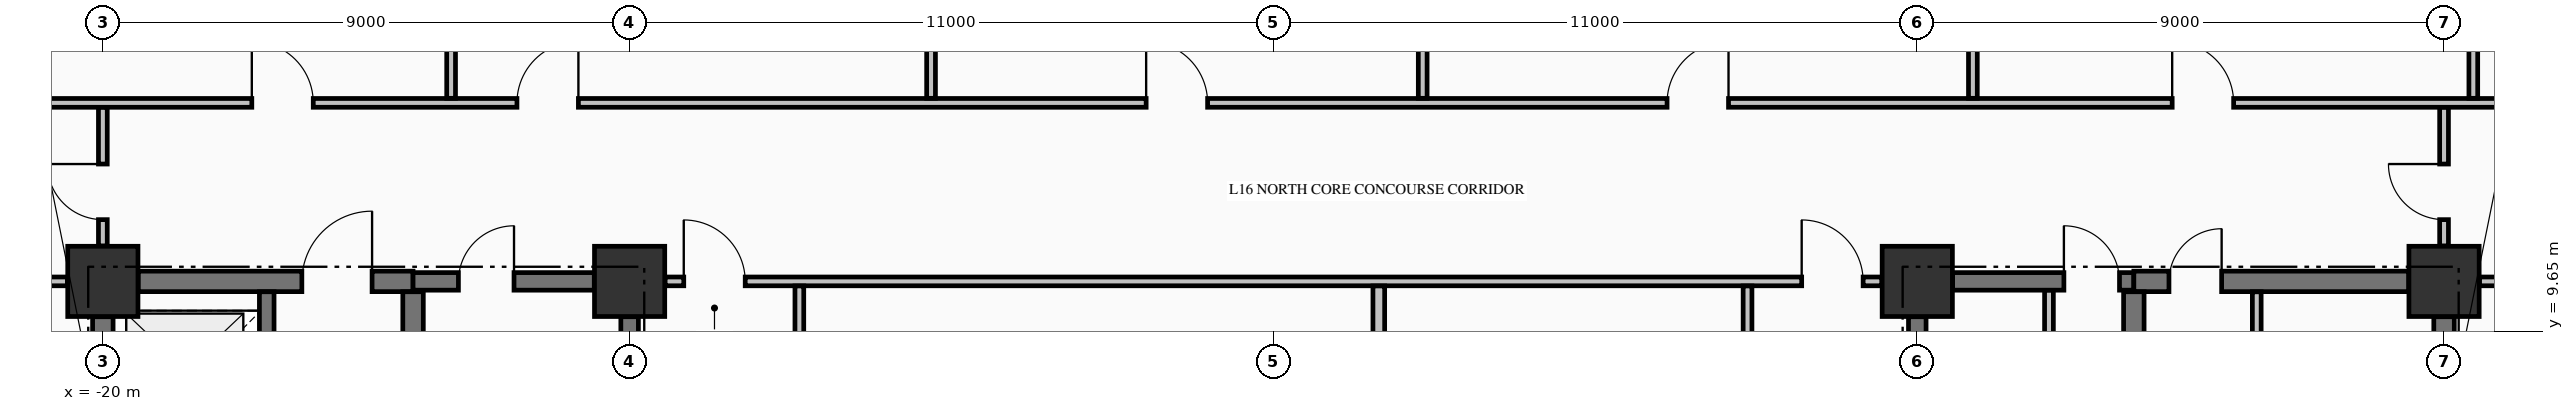
"""IFC4 building model, lengths in metres.
Left out: names, types, materials, properties, quantities, classifications, styles, units other than length and angle.
Written with IfcOpenShell. Run it as: python <this file> out.ifc"""

import sys

from ifc_helpers import new_model, si_unit, direction, frame, frame_2d, origin, origin_2d, place, context, subcontext, project, spatial, rectangle, extrude, element, fill, save


model = new_model("IFC4")
c1 = context("Model", 3, precision=1e-05, world=origin(), true_north=direction((0.0, 1.0)))
c2 = subcontext(c1, "Body", "Model", "MODEL_VIEW")
j1 = project(units=[si_unit("LENGTHUNIT", "METRE"), si_unit("PLANEANGLEUNIT", "RADIAN")], contexts=[c1])
p1 = place(None, origin())
s1 = spatial("IfcSite", under=j1, at=p1, CompositionType="ELEMENT")
p2 = place(p1, origin())
s2 = spatial("IfcBuilding", under=s1, at=p2, CompositionType="ELEMENT")
p3 = place(p2, frame((0.0, 0.0, 67.9)))
s3 = spatial("IfcBuildingStorey", under=s2, at=p3, CompositionType="ELEMENT", Elevation=67.9)
for number, where, z_axis, x_axis in (
    (1, (-20.0, 10.5, -0.25), (0.0, 0.0, 1.0), (1.0, 0.0, 0.0)),
    (2, (-11.0, 10.5, -0.25), (0.0, 0.0, 1.0), (1.0, 0.0, 0.0)),
    (3, (11.0, 10.5, -0.25), (0.0, 0.0, 1.0), (1.0, 0.0, 0.0)),
    (4, (20.0, 10.5, -0.25), (0.0, 0.0, 1.0), (1.0, 0.0, 0.0)),
):
    element("IfcColumn", number, at=place(p3, frame(where, z_axis=z_axis, x_axis=x_axis)), inside=s3, PredefinedType="COLUMN", context=c2, shape_type="SweptSolid", body=[
        extrude(rectangle(XDim=1.2, YDim=1.2, at=origin_2d()), origin(), (0.0, 0.0, 1.0), 3.495),
    ])
p4 = place(p3, frame((-19.396, 10.5, 0.0), z_axis=(0.0, 0.0, 1.0), x_axis=(1.0, 0.0, 0.0)))
e5 = element("IfcWall", 5, at=p4, inside=s3, PredefinedType="SHEAR", context=c2, shape_type="SweptSolid", body=[
    extrude(rectangle(XDim=4.696, YDim=0.35, at=frame_2d((2.348, 0.0))), origin(), (0.0, 0.0, 1.0), 3.245),
])
p5 = place(p4, frame((2.796, 0.0, 0.0)))
e6 = element("IfcOpeningElement", 6, at=p5, cuts=e5, PredefinedType="OPENING", context=c2, shape_type="SweptSolid", body=[
    extrude(rectangle(XDim=1.2, YDim=2.15, at=frame_2d((0.6, 1.075))), frame((0.0, 0.185, 0.0), z_axis=(0.0, -1.0, 0.0), x_axis=(1.0, 0.0, 0.0)), (0.0, 0.0, 1.0), 0.37),
])
p6 = place(p3, frame((-14.7, 10.5, 0.0), z_axis=(0.0, 0.0, 1.0), x_axis=(1.0, 0.0, 0.0)))
e7 = element("IfcWall", 7, at=p6, inside=s3, PredefinedType="SHEAR", context=c2, shape_type="SweptSolid", body=[
    extrude(rectangle(XDim=3.096, YDim=0.3, at=frame_2d((1.548, 0.0))), origin(), (0.0, 0.0, 1.0), 3.245),
])
p7 = place(p6, frame((0.775, 0.0, 0.0)))
e8 = element("IfcOpeningElement", 8, at=p7, cuts=e7, PredefinedType="OPENING", context=c2, shape_type="SweptSolid", body=[
    extrude(rectangle(XDim=0.95, YDim=2.15, at=frame_2d((0.475, 1.075))), frame((0.0, 0.16, 0.0), z_axis=(0.0, -1.0, 0.0), x_axis=(1.0, 0.0, 0.0)), (0.0, 0.0, 1.0), 0.32),
])
p8 = place(p3, frame((11.604, 10.5, 0.0), z_axis=(0.0, 0.0, 1.0), x_axis=(1.0, 0.0, 0.0)))
e9 = element("IfcWall", 9, at=p8, inside=s3, PredefinedType="SHEAR", context=c2, shape_type="SweptSolid", body=[
    extrude(rectangle(XDim=3.096, YDim=0.3, at=frame_2d((1.548, 0.0))), origin(), (0.0, 0.0, 1.0), 3.245),
])
p9 = place(p8, frame((1.901, 0.0, 0.0)))
e10 = element("IfcOpeningElement", 10, at=p9, cuts=e9, PredefinedType="OPENING", context=c2, shape_type="SweptSolid", body=[
    extrude(rectangle(XDim=0.95, YDim=2.15, at=frame_2d((0.475, 1.075))), frame((0.0, 0.16, 0.0), z_axis=(0.0, -1.0, 0.0), x_axis=(1.0, 0.0, 0.0)), (0.0, 0.0, 1.0), 0.32),
])
p10 = place(p3, frame((14.7, 10.5, 0.0), z_axis=(0.0, 0.0, 1.0), x_axis=(1.0, 0.0, 0.0)))
e11 = element("IfcWall", 11, at=p10, inside=s3, PredefinedType="SHEAR", context=c2, shape_type="SweptSolid", body=[
    extrude(rectangle(XDim=4.696, YDim=0.35, at=frame_2d((2.348, 0.0))), origin(), (0.0, 0.0, 1.0), 3.245),
])
p11 = place(p10, frame((0.6, 0.0, 0.0)))
e12 = element("IfcOpeningElement", 12, at=p11, cuts=e11, PredefinedType="OPENING", context=c2, shape_type="SweptSolid", body=[
    extrude(rectangle(XDim=0.9, YDim=2.15, at=frame_2d((0.45, 1.075))), frame((0.0, 0.185, 0.0), z_axis=(0.0, -1.0, 0.0), x_axis=(1.0, 0.0, 0.0)), (0.0, 0.0, 1.0), 0.37),
])
p12 = place(p3, frame((-28.835, 10.5, 0.0), z_axis=(0.0, 0.0, 1.0), x_axis=(1.0, 0.0, 0.0)))
e13 = element("IfcWall", 13, at=p12, inside=s3, PredefinedType="PARTITIONING", context=c2, shape_type="SweptSolid", body=[
    extrude(rectangle(XDim=8.229, YDim=0.15, at=frame_2d((4.115, 0.0))), origin(), (0.0, 0.0, 1.0), 3.245),
])
p13 = place(p12, frame((3.835, 0.0, 0.0)))
e14 = element("IfcOpeningElement", 14, at=p13, cuts=e13, PredefinedType="OPENING", context=c2, shape_type="SweptSolid", body=[
    extrude(rectangle(XDim=1.0, YDim=2.15, at=frame_2d((0.5, 1.075))), frame((0.0, 0.085, 0.0), z_axis=(0.0, -1.0, 0.0), x_axis=(1.0, 0.0, 0.0)), (0.0, 0.0, 1.0), 0.17),
])
p14 = place(p3, frame((-10.394, 10.5, 0.0), z_axis=(0.0, 0.0, 1.0), x_axis=(1.0, 0.0, 0.0)))
e15 = element("IfcWall", 15, at=p14, inside=s3, PredefinedType="PARTITIONING", context=c2, shape_type="SweptSolid", body=[
    extrude(rectangle(XDim=20.788, YDim=0.15, at=frame_2d((10.394, 0.0))), origin(), (0.0, 0.0, 1.0), 3.245),
])
p15 = place(p14, frame((0.319, 0.0, 0.0)))
e16 = element("IfcOpeningElement", 16, at=p15, cuts=e15, PredefinedType="OPENING", context=c2, shape_type="SweptSolid", body=[
    extrude(rectangle(XDim=1.05, YDim=2.15, at=frame_2d((0.525, 1.075))), frame((0.0, 0.085, 0.0), z_axis=(0.0, -1.0, 0.0), x_axis=(1.0, 0.0, 0.0)), (0.0, 0.0, 1.0), 0.17),
])
p16 = place(p14, frame((19.419, 0.0, 0.0)))
e17 = element("IfcOpeningElement", 17, at=p16, cuts=e15, PredefinedType="OPENING", context=c2, shape_type="SweptSolid", body=[
    extrude(rectangle(XDim=1.05, YDim=2.15, at=frame_2d((0.525, 1.075))), frame((0.0, 0.085, 0.0), z_axis=(0.0, -1.0, 0.0), x_axis=(1.0, 0.0, 0.0)), (0.0, 0.0, 1.0), 0.17),
])
p17 = place(p3, frame((20.606, 10.5, 0.0), z_axis=(0.0, 0.0, 1.0), x_axis=(1.0, 0.0, 0.0)))
e18 = element("IfcWall", 18, at=p17, inside=s3, PredefinedType="PARTITIONING", context=c2, shape_type="SweptSolid", body=[
    extrude(rectangle(XDim=3.229, YDim=0.15, at=frame_2d((1.615, 0.0))), origin(), (0.0, 0.0, 1.0), 3.245),
])
p18 = place(p17, frame((0.919, 0.0, 0.0)))
e19 = element("IfcOpeningElement", 19, at=p18, cuts=e18, PredefinedType="OPENING", context=c2, shape_type="SweptSolid", body=[
    extrude(rectangle(XDim=0.95, YDim=2.15, at=frame_2d((0.475, 1.075))), frame((0.0, 0.085, 0.0), z_axis=(0.0, -1.0, 0.0), x_axis=(1.0, 0.0, 0.0)), (0.0, 0.0, 1.0), 0.17),
])
p19 = place(p3, frame((-28.835, 13.55, 0.0), z_axis=(0.0, 0.0, 1.0), x_axis=(1.0, 0.0, 0.0)))
e20 = element("IfcWall", 20, at=p19, inside=s3, PredefinedType="PARTITIONING", context=c2, shape_type="SweptSolid", body=[
    extrude(rectangle(XDim=52.67, YDim=0.15, at=frame_2d((26.335, 0.0))), origin(), (0.0, 0.0, 1.0), 3.245),
])
p20 = place(p19, frame((11.38, 0.0, 0.0)))
e21 = element("IfcOpeningElement", 21, at=p20, cuts=e20, PredefinedType="OPENING", context=c2, shape_type="SweptSolid", body=[
    extrude(rectangle(XDim=1.05, YDim=2.15, at=frame_2d((0.525, 1.075))), frame((0.0, 0.085, 0.0), z_axis=(0.0, -1.0, 0.0), x_axis=(1.0, 0.0, 0.0)), (0.0, 0.0, 1.0), 0.17),
])
p21 = place(p19, frame((15.91, 0.0, 0.0)))
e22 = element("IfcOpeningElement", 22, at=p21, cuts=e20, PredefinedType="OPENING", context=c2, shape_type="SweptSolid", body=[
    extrude(rectangle(XDim=1.05, YDim=2.15, at=frame_2d((0.525, 1.075))), frame((0.0, 0.085, 0.0), z_axis=(0.0, -1.0, 0.0), x_axis=(1.0, 0.0, 0.0)), (0.0, 0.0, 1.0), 0.17),
])
p22 = place(p19, frame((26.66, 0.0, 0.0)))
e23 = element("IfcOpeningElement", 23, at=p22, cuts=e20, PredefinedType="OPENING", context=c2, shape_type="SweptSolid", body=[
    extrude(rectangle(XDim=1.05, YDim=2.15, at=frame_2d((0.525, 1.075))), frame((0.0, 0.085, 0.0), z_axis=(0.0, -1.0, 0.0), x_axis=(1.0, 0.0, 0.0)), (0.0, 0.0, 1.0), 0.17),
])
p23 = place(p19, frame((35.56, 0.0, 0.0)))
e24 = element("IfcOpeningElement", 24, at=p23, cuts=e20, PredefinedType="OPENING", context=c2, shape_type="SweptSolid", body=[
    extrude(rectangle(XDim=1.05, YDim=2.15, at=frame_2d((0.525, 1.075))), frame((0.0, 0.085, 0.0), z_axis=(0.0, -1.0, 0.0), x_axis=(1.0, 0.0, 0.0)), (0.0, 0.0, 1.0), 0.17),
])
p24 = place(p19, frame((44.19, 0.0, 0.0)))
e25 = element("IfcOpeningElement", 25, at=p24, cuts=e20, PredefinedType="OPENING", context=c2, shape_type="SweptSolid", body=[
    extrude(rectangle(XDim=1.05, YDim=2.15, at=frame_2d((0.525, 1.075))), frame((0.0, 0.085, 0.0), z_axis=(0.0, -1.0, 0.0), x_axis=(1.0, 0.0, 0.0)), (0.0, 0.0, 1.0), 0.17),
])
p25 = place(p3, frame((-20.0, 7.727, 0.0), z_axis=(0.0, 0.0, 1.0), x_axis=(0.0, 1.0, 0.0)))
e26 = element("IfcWall", 26, at=p25, inside=s3, PredefinedType="SHEAR", context=c2, shape_type="SweptSolid", body=[
    extrude(rectangle(XDim=2.169, YDim=0.35, at=frame_2d((1.084, 0.0))), origin(), (0.0, 0.0, 1.0), 3.245),
])
p26 = place(p3, frame((-17.2, 7.727, 0.0), z_axis=(0.0, 0.0, 1.0), x_axis=(0.0, 1.0, 0.0)))
e27 = element("IfcWall", 27, at=p26, inside=s3, PredefinedType="SOLIDWALL", context=c2, shape_type="SweptSolid", body=[
    extrude(rectangle(XDim=2.596, YDim=0.25, at=frame_2d((1.298, 0.0))), origin(), (0.0, 0.0, 1.0), 3.245),
])
p27 = place(p26, frame((0.773, 0.0, 0.0)))
e28 = element("IfcOpeningElement", 28, at=p27, cuts=e27, PredefinedType="OPENING", context=c2, shape_type="SweptSolid", body=[
    extrude(rectangle(XDim=1.1, YDim=2.2, at=frame_2d((0.55, 1.1))), frame((0.0, 0.135, 0.0), z_axis=(0.0, -1.0, 0.0), x_axis=(1.0, 0.0, 0.0)), (0.0, 0.0, 1.0), 0.27),
])
p28 = place(p3, frame((-14.7, 5.852, 0.0), z_axis=(0.0, 0.0, 1.0), x_axis=(0.0, 1.0, 0.0)))
e29 = element("IfcWall", 29, at=p28, inside=s3, PredefinedType="SHEAR", context=c2, shape_type="SweptSolid", body=[
    extrude(rectangle(XDim=4.471, YDim=0.35, at=frame_2d((2.235, 0.0))), origin(), (0.0, 0.0, 1.0), 3.245),
])
for number, where, z_axis, x_axis in (
    (30, (-11.0, 5.852, 0.0), (0.0, 0.0, 1.0), (0.0, 1.0, 0.0)),
    (31, (11.0, 5.852, 0.0), (0.0, 0.0, 1.0), (0.0, 1.0, 0.0)),
):
    element("IfcWall", number, at=place(p3, frame(where, z_axis=z_axis, x_axis=x_axis)), inside=s3, PredefinedType="SHEAR", context=c2, shape_type="SweptSolid", body=[
        extrude(rectangle(XDim=4.044, YDim=0.3, at=frame_2d((2.022, 0.0))), origin(), (0.0, 0.0, 1.0), 3.245),
    ])
p29 = place(p3, frame((14.7, 5.852, 0.0), z_axis=(0.0, 0.0, 1.0), x_axis=(0.0, 1.0, 0.0)))
e32 = element("IfcWall", 32, at=p29, inside=s3, PredefinedType="SHEAR", context=c2, shape_type="SweptSolid", body=[
    extrude(rectangle(XDim=4.471, YDim=0.35, at=frame_2d((2.235, 0.0))), origin(), (0.0, 0.0, 1.0), 3.245),
])
p30 = place(p3, frame((20.0, 0.604, 0.0), z_axis=(0.0, 0.0, 1.0), x_axis=(0.0, 1.0, 0.0)))
e33 = element("IfcWall", 33, at=p30, inside=s3, PredefinedType="SHEAR", context=c2, shape_type="SweptSolid", body=[
    extrude(rectangle(XDim=9.292, YDim=0.35, at=frame_2d((4.646, 0.0))), origin(), (0.0, 0.0, 1.0), 3.245),
])
p31 = place(p3, frame((-20.0, 11.106, 0.0), z_axis=(0.0, 0.0, 1.0), x_axis=(0.0, 1.0, 0.0)))
e34 = element("IfcWall", 34, at=p31, inside=s3, PredefinedType="PARTITIONING", context=c2, shape_type="SweptSolid", body=[
    extrude(rectangle(XDim=2.366, YDim=0.15, at=frame_2d((1.183, 0.0))), origin(), (0.0, 0.0, 1.0), 2.585),
])
p32 = place(p31, frame((0.449, 0.0, 0.0)))
e35 = element("IfcOpeningElement", 35, at=p32, cuts=e34, PredefinedType="OPENING", context=c2, shape_type="SweptSolid", body=[
    extrude(rectangle(XDim=0.95, YDim=2.15, at=frame_2d((0.475, 1.075))), frame((0.0, 0.085, 0.0), z_axis=(0.0, -1.0, 0.0), x_axis=(1.0, 0.0, 0.0)), (0.0, 0.0, 1.0), 0.17),
])
p33 = place(p3, frame((-14.05, 13.628, 0.0), z_axis=(0.0, 0.0, 1.0), x_axis=(0.0, 1.0, 0.0)))
e36 = element("IfcWall", 36, at=p33, inside=s3, PredefinedType="PARTITIONING", context=c2, shape_type="SweptSolid", body=[
    extrude(rectangle(XDim=12.707, YDim=0.15, at=frame_2d((6.354, 0.0))), origin(), (0.0, 0.0, 1.0), 3.245),
])
p34 = place(p3, frame((-8.1, -3.897, 0.0), z_axis=(0.0, 0.0, 1.0), x_axis=(0.0, 1.0, 0.0)))
e37 = element("IfcWall", 37, at=p34, inside=s3, PredefinedType="PARTITIONING", context=c2, shape_type="SweptSolid", body=[
    extrude(rectangle(XDim=14.319, YDim=0.15, at=frame_2d((7.16, 0.0))), origin(), (0.0, 0.0, 1.0), 3.245),
])
p35 = place(p34, frame((6.622, 0.0, 0.0)))
e38 = element("IfcOpeningElement", 38, at=p35, cuts=e37, PredefinedType="OPENING", context=c2, shape_type="SweptSolid", body=[
    extrude(rectangle(XDim=1.05, YDim=2.15, at=frame_2d((0.525, 1.075))), frame((0.0, 0.085, 0.0), z_axis=(0.0, -1.0, 0.0), x_axis=(1.0, 0.0, 0.0)), (0.0, 0.0, 1.0), 0.17),
])
p36 = place(p3, frame((-5.85, 13.628, 0.0), z_axis=(0.0, 0.0, 1.0), x_axis=(0.0, 1.0, 0.0)))
e39 = element("IfcWall", 39, at=p36, inside=s3, PredefinedType="PARTITIONING", context=c2, shape_type="SweptSolid", body=[
    extrude(rectangle(XDim=12.707, YDim=0.15, at=frame_2d((6.354, 0.0))), origin(), (0.0, 0.0, 1.0), 3.245),
])
p37 = place(p3, frame((1.8, 0.303, 0.0), z_axis=(0.0, 0.0, 1.0), x_axis=(0.0, 1.0, 0.0)))
e40 = element("IfcWall", 40, at=p37, inside=s3, PredefinedType="PARTITIONING", context=c2, shape_type="SweptSolid", body=[
    extrude(rectangle(XDim=10.119, YDim=0.2, at=frame_2d((5.06, 0.0))), origin(), (0.0, 0.0, 1.0), 3.245),
])
p38 = place(p3, frame((2.55, 13.628, 0.0), z_axis=(0.0, 0.0, 1.0), x_axis=(0.0, 1.0, 0.0)))
e41 = element("IfcWall", 41, at=p38, inside=s3, PredefinedType="PARTITIONING", context=c2, shape_type="SweptSolid", body=[
    extrude(rectangle(XDim=12.707, YDim=0.15, at=frame_2d((6.354, 0.0))), origin(), (0.0, 0.0, 1.0), 3.245),
])
p39 = place(p3, frame((8.1, 0.303, 0.0), z_axis=(0.0, 0.0, 1.0), x_axis=(0.0, 1.0, 0.0)))
e42 = element("IfcWall", 42, at=p39, inside=s3, PredefinedType="PARTITIONING", context=c2, shape_type="SweptSolid", body=[
    extrude(rectangle(XDim=10.119, YDim=0.15, at=frame_2d((5.06, 0.0))), origin(), (0.0, 0.0, 1.0), 3.245),
])
p40 = place(p39, frame((4.497, 0.0, 0.0)))
e43 = element("IfcOpeningElement", 43, at=p40, cuts=e42, PredefinedType="OPENING", context=c2, shape_type="SweptSolid", body=[
    extrude(rectangle(XDim=1.1, YDim=2.15, at=frame_2d((0.55, 1.075))), frame((0.0, 0.085, 0.0), z_axis=(0.0, -1.0, 0.0), x_axis=(1.0, 0.0, 0.0)), (0.0, 0.0, 1.0), 0.17),
])
p41 = place(p3, frame((11.95, 13.628, 0.0), z_axis=(0.0, 0.0, 1.0), x_axis=(0.0, 1.0, 0.0)))
e44 = element("IfcWall", 44, at=p41, inside=s3, PredefinedType="PARTITIONING", context=c2, shape_type="SweptSolid", body=[
    extrude(rectangle(XDim=12.707, YDim=0.15, at=frame_2d((6.354, 0.0))), origin(), (0.0, 0.0, 1.0), 3.245),
])
p42 = place(p3, frame((13.25, 5.853, 0.0), z_axis=(0.0, 0.0, 1.0), x_axis=(0.0, 1.0, 0.0)))
e45 = element("IfcWall", 45, at=p42, inside=s3, PredefinedType="PARTITIONING", context=c2, shape_type="SweptSolid", body=[
    extrude(rectangle(XDim=4.494, YDim=0.15, at=frame_2d((2.247, 0.0))), origin(), (0.0, 0.0, 1.0), 3.245),
])
p43 = place(p42, frame((1.472, 0.0, 0.0)))
e46 = element("IfcOpeningElement", 46, at=p43, cuts=e45, PredefinedType="OPENING", context=c2, shape_type="SweptSolid", body=[
    extrude(rectangle(XDim=0.95, YDim=2.15, at=frame_2d((0.475, 1.075))), frame((0.0, 0.085, 0.0), z_axis=(0.0, -1.0, 0.0), x_axis=(1.0, 0.0, 0.0)), (0.0, 0.0, 1.0), 0.17),
])
p44 = place(p3, frame((16.8, 6.578, 0.0), z_axis=(0.0, 0.0, 1.0), x_axis=(0.0, 1.0, 0.0)))
e47 = element("IfcWall", 47, at=p44, inside=s3, PredefinedType="PARTITIONING", context=c2, shape_type="SweptSolid", body=[
    extrude(rectangle(XDim=3.744, YDim=0.15, at=frame_2d((1.872, 0.0))), origin(), (0.0, 0.0, 1.0), 3.245),
])
p45 = place(p44, frame((1.447, 0.0, 0.0)))
e48 = element("IfcOpeningElement", 48, at=p45, cuts=e47, PredefinedType="OPENING", context=c2, shape_type="SweptSolid", body=[
    extrude(rectangle(XDim=0.95, YDim=2.15, at=frame_2d((0.475, 1.075))), frame((0.0, 0.085, 0.0), z_axis=(0.0, -1.0, 0.0), x_axis=(1.0, 0.0, 0.0)), (0.0, 0.0, 1.0), 0.17),
])
p46 = place(p3, frame((20.0, 11.106, 0.0), z_axis=(0.0, 0.0, 1.0), x_axis=(0.0, 1.0, 0.0)))
e49 = element("IfcWall", 49, at=p46, inside=s3, PredefinedType="PARTITIONING", context=c2, shape_type="SweptSolid", body=[
    extrude(rectangle(XDim=2.366, YDim=0.15, at=frame_2d((1.183, 0.0))), origin(), (0.0, 0.0, 1.0), 3.245),
])
p47 = place(p46, frame((0.449, 0.0, 0.0)))
e50 = element("IfcOpeningElement", 50, at=p47, cuts=e49, PredefinedType="OPENING", context=c2, shape_type="SweptSolid", body=[
    extrude(rectangle(XDim=0.95, YDim=2.15, at=frame_2d((0.475, 1.075))), frame((0.0, 0.085, 0.0), z_axis=(0.0, -1.0, 0.0), x_axis=(1.0, 0.0, 0.0)), (0.0, 0.0, 1.0), 0.17),
])
p48 = place(p3, frame((20.5, 13.628, 0.0), z_axis=(0.0, 0.0, 1.0), x_axis=(0.0, 1.0, 0.0)))
e51 = element("IfcWall", 51, at=p48, inside=s3, PredefinedType="PARTITIONING", context=c2, shape_type="SweptSolid", body=[
    extrude(rectangle(XDim=8.666, YDim=0.15, at=frame_2d((4.333, 0.0))), origin(), (0.0, 0.0, 1.0), 3.245),
])
p49 = place(p7, origin())
e52 = element("IfcDoor", 52, at=p49, inside=s3, OperationType="SINGLE_SWING_RIGHT", PredefinedType="DOOR", context=c2, shape_type="SweptSolid", body=[
    extrude(rectangle(XDim=0.95, YDim=2.15, at=frame_2d((0.475, 1.075))), frame((0.0, 0.025, 0.0), z_axis=(0.0, -1.0, 0.0), x_axis=(1.0, 0.0, 0.0)), (0.0, 0.0, 1.0), 0.05),
])
fill(e8, e52)
p50 = place(p9, origin())
e53 = element("IfcDoor", 53, at=p50, inside=s3, OperationType="SINGLE_SWING_LEFT", PredefinedType="DOOR", context=c2, shape_type="SweptSolid", body=[
    extrude(rectangle(XDim=0.95, YDim=2.15, at=frame_2d((0.475, 1.075))), frame((0.0, 0.025, 0.0), z_axis=(0.0, -1.0, 0.0), x_axis=(1.0, 0.0, 0.0)), (0.0, 0.0, 1.0), 0.05),
])
fill(e10, e53)
p51 = place(p5, origin())
e54 = element("IfcDoor", 54, at=p51, inside=s3, OperationType="SINGLE_SWING_RIGHT", PredefinedType="DOOR", context=c2, shape_type="SweptSolid", body=[
    extrude(rectangle(XDim=1.2, YDim=2.15, at=frame_2d((0.6, 1.075))), frame((0.0, 0.025, 0.0), z_axis=(0.0, -1.0, 0.0), x_axis=(1.0, 0.0, 0.0)), (0.0, 0.0, 1.0), 0.05),
])
fill(e6, e54)
p52 = place(p11, origin())
e55 = element("IfcDoor", 55, at=p52, inside=s3, OperationType="SINGLE_SWING_RIGHT", PredefinedType="DOOR", context=c2, shape_type="SweptSolid", body=[
    extrude(rectangle(XDim=0.9, YDim=2.15, at=frame_2d((0.45, 1.075))), frame((0.0, 0.025, 0.0), z_axis=(0.0, -1.0, 0.0), x_axis=(1.0, 0.0, 0.0)), (0.0, 0.0, 1.0), 0.05),
])
fill(e12, e55)
p53 = place(p15, origin())
e56 = element("IfcDoor", 56, at=p53, inside=s3, OperationType="SINGLE_SWING_LEFT", PredefinedType="DOOR", context=c2, shape_type="SweptSolid", body=[
    extrude(rectangle(XDim=1.05, YDim=2.15, at=frame_2d((0.525, 1.075))), frame((0.0, 0.025, 0.0), z_axis=(0.0, -1.0, 0.0), x_axis=(1.0, 0.0, 0.0)), (0.0, 0.0, 1.0), 0.05),
])
fill(e16, e56)
p54 = place(p16, origin())
e57 = element("IfcDoor", 57, at=p54, inside=s3, OperationType="SINGLE_SWING_LEFT", PredefinedType="DOOR", context=c2, shape_type="SweptSolid", body=[
    extrude(rectangle(XDim=1.05, YDim=2.15, at=frame_2d((0.525, 1.075))), frame((0.0, 0.025, 0.0), z_axis=(0.0, -1.0, 0.0), x_axis=(1.0, 0.0, 0.0)), (0.0, 0.0, 1.0), 0.05),
])
fill(e17, e57)
p55 = place(p20, origin())
e58 = element("IfcDoor", 58, at=p55, inside=s3, OperationType="SINGLE_SWING_LEFT", PredefinedType="DOOR", context=c2, shape_type="SweptSolid", body=[
    extrude(rectangle(XDim=1.05, YDim=2.15, at=frame_2d((0.525, 1.075))), frame((0.0, 0.025, 0.0), z_axis=(0.0, -1.0, 0.0), x_axis=(1.0, 0.0, 0.0)), (0.0, 0.0, 1.0), 0.05),
])
fill(e21, e58)
p56 = place(p21, origin())
e59 = element("IfcDoor", 59, at=p56, inside=s3, OperationType="SINGLE_SWING_RIGHT", PredefinedType="DOOR", context=c2, shape_type="SweptSolid", body=[
    extrude(rectangle(XDim=1.05, YDim=2.15, at=frame_2d((0.525, 1.075))), frame((0.0, 0.025, 0.0), z_axis=(0.0, -1.0, 0.0), x_axis=(1.0, 0.0, 0.0)), (0.0, 0.0, 1.0), 0.05),
])
fill(e22, e59)
p57 = place(p22, origin())
e60 = element("IfcDoor", 60, at=p57, inside=s3, OperationType="SINGLE_SWING_LEFT", PredefinedType="DOOR", context=c2, shape_type="SweptSolid", body=[
    extrude(rectangle(XDim=1.05, YDim=2.15, at=frame_2d((0.525, 1.075))), frame((0.0, 0.025, 0.0), z_axis=(0.0, -1.0, 0.0), x_axis=(1.0, 0.0, 0.0)), (0.0, 0.0, 1.0), 0.05),
])
fill(e23, e60)
p58 = place(p23, origin())
e61 = element("IfcDoor", 61, at=p58, inside=s3, OperationType="SINGLE_SWING_RIGHT", PredefinedType="DOOR", context=c2, shape_type="SweptSolid", body=[
    extrude(rectangle(XDim=1.05, YDim=2.15, at=frame_2d((0.525, 1.075))), frame((0.0, 0.025, 0.0), z_axis=(0.0, -1.0, 0.0), x_axis=(1.0, 0.0, 0.0)), (0.0, 0.0, 1.0), 0.05),
])
fill(e24, e61)
p59 = place(p24, origin())
e62 = element("IfcDoor", 62, at=p59, inside=s3, OperationType="SINGLE_SWING_LEFT", PredefinedType="DOOR", context=c2, shape_type="SweptSolid", body=[
    extrude(rectangle(XDim=1.05, YDim=2.15, at=frame_2d((0.525, 1.075))), frame((0.0, 0.025, 0.0), z_axis=(0.0, -1.0, 0.0), x_axis=(1.0, 0.0, 0.0)), (0.0, 0.0, 1.0), 0.05),
])
fill(e25, e62)
p60 = place(p32, origin())
e63 = element("IfcDoor", 63, at=p60, inside=s3, OperationType="SINGLE_SWING_RIGHT", PredefinedType="DOOR", context=c2, shape_type="SweptSolid", body=[
    extrude(rectangle(XDim=0.95, YDim=2.15, at=frame_2d((0.475, 1.075))), frame((0.0, 0.025, 0.0), z_axis=(0.0, -1.0, 0.0), x_axis=(1.0, 0.0, 0.0)), (0.0, 0.0, 1.0), 0.05),
])
fill(e35, e63)
p61 = place(p47, origin())
e64 = element("IfcDoor", 64, at=p61, inside=s3, OperationType="SINGLE_SWING_RIGHT", PredefinedType="DOOR", context=c2, shape_type="SweptSolid", body=[
    extrude(rectangle(XDim=0.95, YDim=2.15, at=frame_2d((0.475, 1.075))), frame((0.0, 0.025, 0.0), z_axis=(0.0, -1.0, 0.0), x_axis=(1.0, 0.0, 0.0)), (0.0, 0.0, 1.0), 0.05),
])
fill(e50, e64)
save(model, sys.argv[1])
